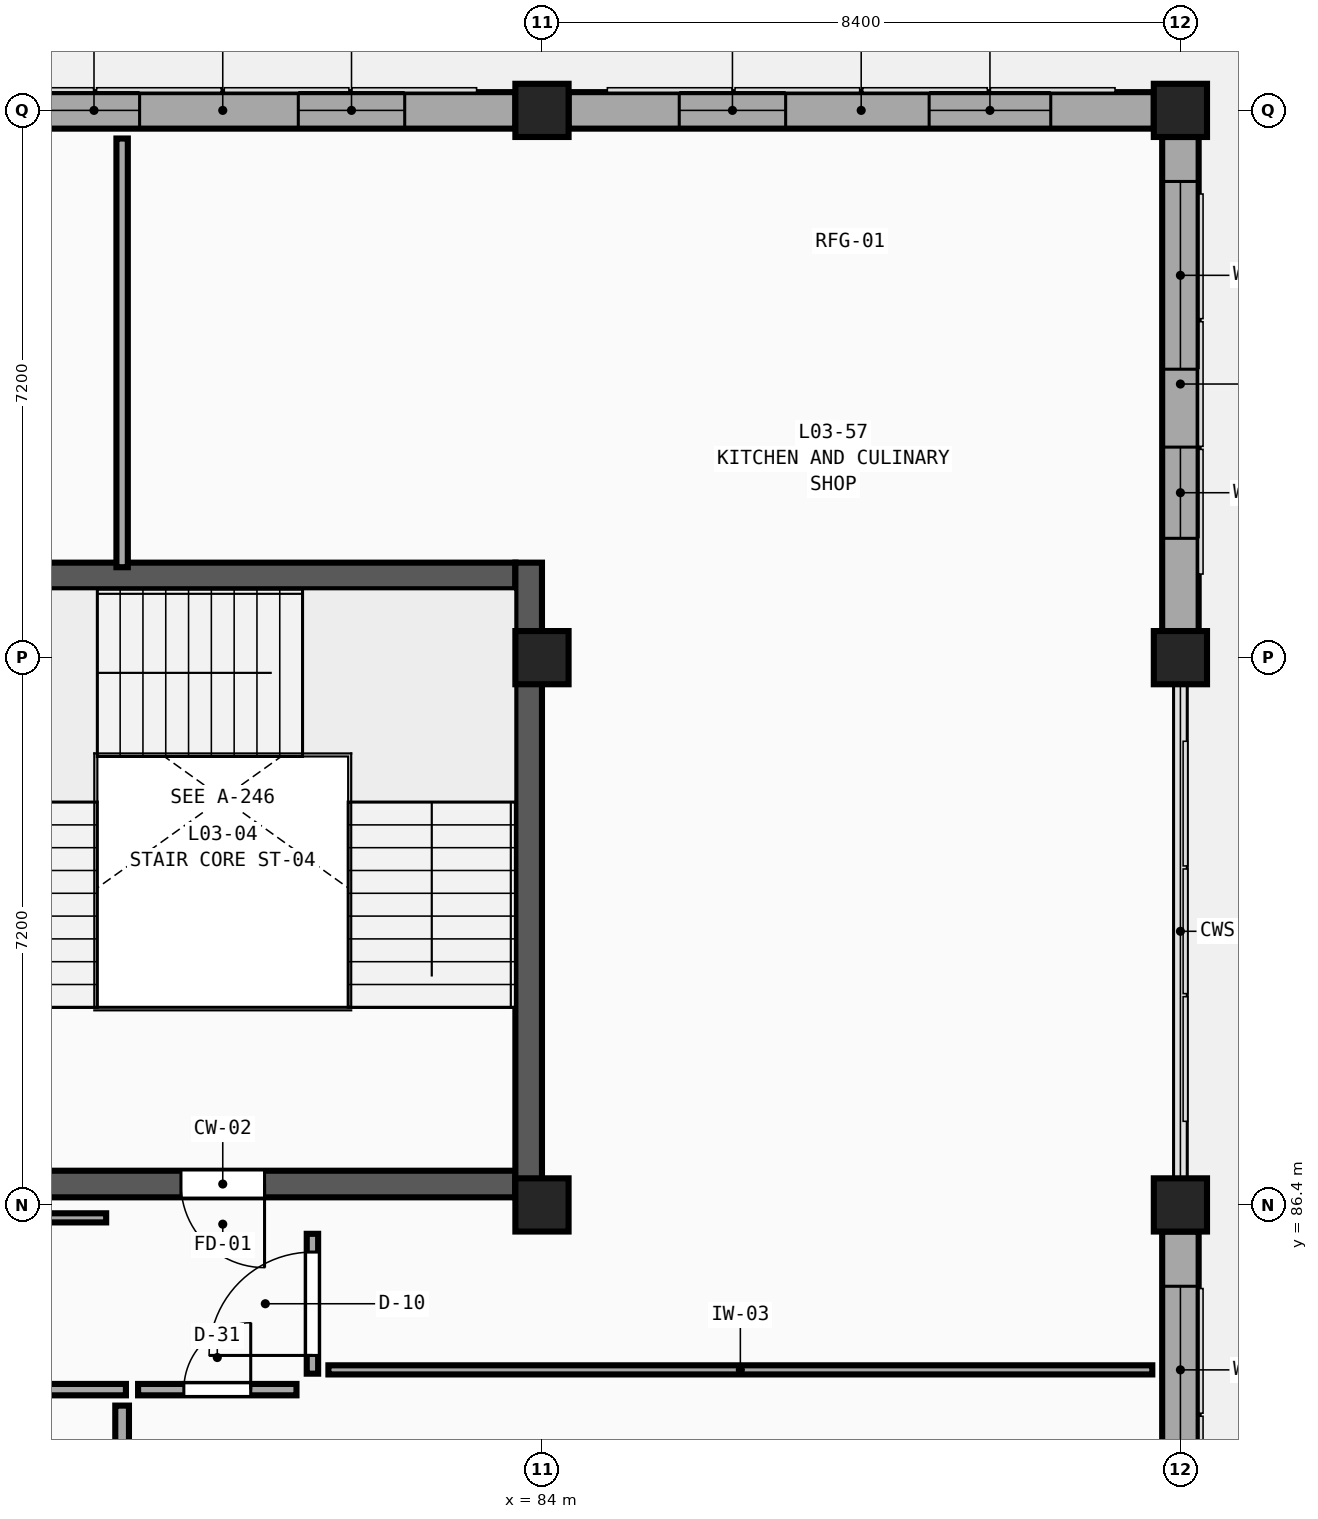
"""IFC4 building model, lengths in metres.
Left out: names, types, materials, properties, quantities, classifications, styles, units other than length and angle.
Written with IfcOpenShell. Run it as: python <this file> out.ifc"""

import sys

from ifc_helpers import new_model, si_unit, direction, frame, frame_2d, origin, origin_2d, place, context, subcontext, project, spatial, rectangle, extrude, element, fill, save


model = new_model("IFC4")
c1 = context("Model", 3, precision=1e-05, world=origin(), true_north=direction((0.0, 1.0)))
c2 = subcontext(c1, "Body", "Model", "MODEL_VIEW")
j1 = project(units=[si_unit("LENGTHUNIT", "METRE"), si_unit("PLANEANGLEUNIT", "RADIAN")], contexts=[c1])
p1 = place(None, origin())
s1 = spatial("IfcSite", under=j1, at=p1, CompositionType="ELEMENT")
p2 = place(p1, origin())
s2 = spatial("IfcBuilding", under=s1, at=p2, CompositionType="ELEMENT")
p3 = place(p2, frame((0.0, 0.0, 14.4)))
s3 = spatial("IfcBuildingStorey", under=s2, at=p3, CompositionType="ELEMENT", Elevation=14.4)
for number, where, z_axis, x_axis in (
    (1, (84.0, 86.4, 0.0), (0.0, 0.0, 1.0), (1.0, 0.0, 0.0)),
    (2, (84.0, 93.6, 0.0), (0.0, 0.0, 1.0), (1.0, 0.0, 0.0)),
    (3, (84.0, 100.8, 0.0), (0.0, 0.0, 1.0), (1.0, 0.0, 0.0)),
    (4, (92.4, 86.4, 0.0), (0.0, 0.0, 1.0), (1.0, 0.0, 0.0)),
    (5, (92.4, 93.6, 0.0), (0.0, 0.0, 1.0), (1.0, 0.0, 0.0)),
    (6, (92.4, 100.8, 0.0), (0.0, 0.0, 1.0), (1.0, 0.0, 0.0)),
):
    element("IfcColumn", number, at=place(p3, frame(where, z_axis=z_axis, x_axis=x_axis)), inside=s3, PredefinedType="COLUMN", context=c2, shape_type="SweptSolid", body=[
        extrude(rectangle(XDim=0.7, YDim=0.7, at=origin_2d()), origin(), (0.0, 0.0, 1.0), 4.5),
    ])
p4 = place(p3, frame((75.95, 100.8, 0.0), z_axis=(0.0, 0.0, 1.0), x_axis=(1.0, 0.0, 0.0)))
e7 = element("IfcWall", 7, at=p4, inside=s3, PredefinedType="SOLIDWALL", context=c2, shape_type="SweptSolid", body=[
    extrude(rectangle(XDim=7.7, YDim=0.48, at=frame_2d((3.85, 0.0))), origin(), (0.0, 0.0, 1.0), 3.63),
])
p5 = place(p4, frame((1.556, 0.0, 0.75)))
e8 = element("IfcOpeningElement", 8, at=p5, cuts=e7, PredefinedType="OPENING", context=c2, shape_type="SweptSolid", body=[
    extrude(rectangle(XDim=1.2, YDim=2.73, at=frame_2d((0.6, 1.365))), frame((0.0, 0.26, 0.0), z_axis=(0.0, -1.0, 0.0), x_axis=(1.0, 0.0, 0.0)), (0.0, 0.0, 1.0), 0.52),
])
p6 = place(p4, frame((4.844, 0.0, 0.75)))
e9 = element("IfcOpeningElement", 9, at=p6, cuts=e7, PredefinedType="OPENING", context=c2, shape_type="SweptSolid", body=[
    extrude(rectangle(XDim=1.4, YDim=2.73, at=frame_2d((0.7, 1.365))), frame((0.0, 0.26, 0.0), z_axis=(0.0, -1.0, 0.0), x_axis=(1.0, 0.0, 0.0)), (0.0, 0.0, 1.0), 0.52),
])
p7 = place(p3, frame((92.4, 86.05, 0.0), z_axis=(0.0, 0.0, 1.0), x_axis=(0.0, -1.0, 0.0)))
e10 = element("IfcWall", 10, at=p7, inside=s3, PredefinedType="SOLIDWALL", context=c2, shape_type="SweptSolid", body=[
    extrude(rectangle(XDim=6.5, YDim=0.48, at=frame_2d((3.25, 0.0))), origin(), (0.0, 0.0, 1.0), 3.63),
])
p8 = place(p7, frame((0.72, 0.0, 0.75)))
e11 = element("IfcOpeningElement", 11, at=p8, cuts=e10, PredefinedType="OPENING", context=c2, shape_type="SweptSolid", body=[
    extrude(rectangle(XDim=2.2, YDim=2.73, at=frame_2d((1.1, 1.365))), frame((0.0, 0.26, 0.0), z_axis=(0.0, -1.0, 0.0), x_axis=(1.0, 0.0, 0.0)), (0.0, 0.0, 1.0), 0.52),
])
p9 = place(p7, frame((3.48, 0.0, 0.75)))
e12 = element("IfcOpeningElement", 12, at=p9, cuts=e10, PredefinedType="OPENING", context=c2, shape_type="SweptSolid", body=[
    extrude(rectangle(XDim=2.4, YDim=2.73, at=frame_2d((1.2, 1.365))), frame((0.0, 0.26, 0.0), z_axis=(0.0, -1.0, 0.0), x_axis=(1.0, 0.0, 0.0)), (0.0, 0.0, 1.0), 0.52),
])
p10 = place(p3, frame((92.4, 100.45, 0.0), z_axis=(0.0, 0.0, 1.0), x_axis=(0.0, -1.0, 0.0)))
e13 = element("IfcWall", 13, at=p10, inside=s3, PredefinedType="SOLIDWALL", context=c2, shape_type="SweptSolid", body=[
    extrude(rectangle(XDim=6.5, YDim=0.48, at=frame_2d((3.25, 0.0))), origin(), (0.0, 0.0, 1.0), 3.63),
])
p11 = place(p10, frame((0.585, 0.0, 0.75)))
e14 = element("IfcOpeningElement", 14, at=p11, cuts=e13, PredefinedType="OPENING", context=c2, shape_type="SweptSolid", body=[
    extrude(rectangle(XDim=2.47, YDim=2.73, at=frame_2d((1.235, 1.365))), frame((0.0, 0.26, 0.0), z_axis=(0.0, -1.0, 0.0), x_axis=(1.0, 0.0, 0.0)), (0.0, 0.0, 1.0), 0.52),
])
p12 = place(p10, frame((4.08, 0.0, 0.75)))
e15 = element("IfcOpeningElement", 15, at=p12, cuts=e13, PredefinedType="OPENING", context=c2, shape_type="SweptSolid", body=[
    extrude(rectangle(XDim=1.2, YDim=1.9, at=frame_2d((0.6, 0.95))), frame((0.0, 0.26, 0.0), z_axis=(0.0, -1.0, 0.0), x_axis=(1.0, 0.0, 0.0)), (0.0, 0.0, 1.0), 0.52),
])
p13 = place(p3, frame((84.35, 100.8, 0.0), z_axis=(0.0, 0.0, 1.0), x_axis=(1.0, 0.0, 0.0)))
e16 = element("IfcWall", 16, at=p13, inside=s3, PredefinedType="SOLIDWALL", context=c2, shape_type="SweptSolid", body=[
    extrude(rectangle(XDim=7.7, YDim=0.48, at=frame_2d((3.85, 0.0))), origin(), (0.0, 0.0, 1.0), 3.63),
])
p14 = place(p13, frame((1.456, 0.0, 0.75)))
e17 = element("IfcOpeningElement", 17, at=p14, cuts=e16, PredefinedType="OPENING", context=c2, shape_type="SweptSolid", body=[
    extrude(rectangle(XDim=1.4, YDim=1.9, at=frame_2d((0.7, 0.95))), frame((0.0, 0.26, 0.0), z_axis=(0.0, -1.0, 0.0), x_axis=(1.0, 0.0, 0.0)), (0.0, 0.0, 1.0), 0.52),
])
p15 = place(p13, frame((4.744, 0.0, 0.75)))
e18 = element("IfcOpeningElement", 18, at=p15, cuts=e16, PredefinedType="OPENING", context=c2, shape_type="SweptSolid", body=[
    extrude(rectangle(XDim=1.6, YDim=1.9, at=frame_2d((0.8, 0.95))), frame((0.0, 0.26, 0.0), z_axis=(0.0, -1.0, 0.0), x_axis=(1.0, 0.0, 0.0)), (0.0, 0.0, 1.0), 0.52),
])
p16 = place(p3, frame((83.65, 86.675, 0.0), z_axis=(0.0, 0.0, 1.0), x_axis=(-1.0, 0.0, 0.0)))
e19 = element("IfcWall", 19, at=p16, inside=s3, PredefinedType="SHEAR", context=c2, shape_type="SweptSolid", body=[
    extrude(rectangle(XDim=7.7, YDim=0.35, at=frame_2d((3.85, 0.0))), origin(), (0.0, 0.0, 1.0), 4.5),
])
p17 = place(p16, frame((3.3, 0.0, 0.0)))
e20 = element("IfcOpeningElement", 20, at=p17, cuts=e19, PredefinedType="OPENING", context=c2, shape_type="SweptSolid", body=[
    extrude(rectangle(XDim=1.1, YDim=2.2, at=frame_2d((0.55, 1.1))), frame((0.0, 0.195, 0.0), z_axis=(0.0, -1.0, 0.0), x_axis=(1.0, 0.0, 0.0)), (0.0, 0.0, 1.0), 0.39),
])
p18 = place(p3, frame((75.95, 94.675, 0.0), z_axis=(0.0, 0.0, 1.0), x_axis=(1.0, 0.0, 0.0)))
e21 = element("IfcWall", 21, at=p18, inside=s3, PredefinedType="SHEAR", context=c2, shape_type="SweptSolid", body=[
    extrude(rectangle(XDim=7.7, YDim=0.35, at=frame_2d((3.85, 0.0))), origin(), (0.0, 0.0, 1.0), 4.5),
])
p19 = place(p3, frame((83.825, 86.5, 0.0), z_axis=(0.0, 0.0, 1.0), x_axis=(0.0, 1.0, 0.0)))
e22 = element("IfcWall", 22, at=p19, inside=s3, PredefinedType="SHEAR", context=c2, shape_type="SweptSolid", body=[
    extrude(rectangle(XDim=8.35, YDim=0.35, at=frame_2d((4.175, 0.0))), origin(), (0.0, 0.0, 1.0), 4.5),
])
p20 = place(p3, frame((62.562, 83.97, 0.0), z_axis=(0.0, 0.0, 1.0), x_axis=(1.0, 0.0, 0.0)))
e23 = element("IfcWall", 23, at=p20, inside=s3, PredefinedType="PARTITIONING", context=c2, shape_type="SweptSolid", body=[
    extrude(rectangle(XDim=15.964, YDim=0.15, at=frame_2d((7.982, 0.0))), origin(), (0.0, 0.0, 1.0), 4.18),
])
p21 = place(p20, frame((7.302, 0.0, 0.0)))
e24 = element("IfcOpeningElement", 24, at=p21, cuts=e23, PredefinedType="OPENING", context=c2, shape_type="SweptSolid", body=[
    extrude(rectangle(XDim=1.36, YDim=2.37, at=frame_2d((0.68, 1.185))), frame((0.0, 0.095, 0.0), z_axis=(0.0, -1.0, 0.0), x_axis=(1.0, 0.0, 0.0)), (0.0, 0.0, 1.0), 0.19),
])
p22 = place(p3, frame((75.97, 86.23, 0.0), z_axis=(0.0, 0.0, 1.0), x_axis=(1.0, 0.0, 0.0)))
e25 = element("IfcWall", 25, at=p22, inside=s3, PredefinedType="PARTITIONING", context=c2, shape_type="SweptSolid", body=[
    extrude(rectangle(XDim=2.296, YDim=0.12, at=frame_2d((1.148, 0.0))), origin(), (0.0, 0.0, 1.0), 3.73),
])
p23 = place(p3, frame((78.686, 83.97, 0.0), z_axis=(0.0, 0.0, 1.0), x_axis=(1.0, 0.0, 0.0)))
e26 = element("IfcWall", 26, at=p23, inside=s3, PredefinedType="PARTITIONING", context=c2, shape_type="SweptSolid", body=[
    extrude(rectangle(XDim=2.084, YDim=0.15, at=frame_2d((1.042, 0.0))), origin(), (0.0, 0.0, 1.0), 4.18),
])
p24 = place(p23, frame((0.602, 0.0, 0.0)))
e27 = element("IfcOpeningElement", 27, at=p24, cuts=e26, PredefinedType="OPENING", context=c2, shape_type="SweptSolid", body=[
    extrude(rectangle(XDim=0.88, YDim=2.45, at=frame_2d((0.44, 1.225))), frame((0.0, 0.095, 0.0), z_axis=(0.0, -1.0, 0.0), x_axis=(1.0, 0.0, 0.0)), (0.0, 0.0, 1.0), 0.19),
])
p25 = place(p3, frame((80.98, 84.18, 0.0), z_axis=(0.0, 0.0, 1.0), x_axis=(0.0, 1.0, 0.0)))
e28 = element("IfcWall", 28, at=p25, inside=s3, PredefinedType="PARTITIONING", context=c2, shape_type="SweptSolid", body=[
    extrude(rectangle(XDim=1.84, YDim=0.15, at=frame_2d((0.92, 0.0))), origin(), (0.0, 0.0, 1.0), 4.18),
])
p26 = place(p25, frame((0.24, 0.0, 0.0)))
e29 = element("IfcOpeningElement", 29, at=p26, cuts=e28, PredefinedType="OPENING", context=c2, shape_type="SweptSolid", body=[
    extrude(rectangle(XDim=1.36, YDim=2.13, at=frame_2d((0.68, 1.065))), frame((0.0, 0.095, 0.0), z_axis=(0.0, -1.0, 0.0), x_axis=(1.0, 0.0, 0.0)), (0.0, 0.0, 1.0), 0.19),
])
p27 = place(p3, frame((81.19, 84.23, 0.0), z_axis=(0.0, 0.0, 1.0), x_axis=(1.0, 0.0, 0.0)))
e30 = element("IfcWall", 30, at=p27, inside=s3, PredefinedType="PARTITIONING", context=c2, shape_type="SweptSolid", body=[
    extrude(rectangle(XDim=10.84, YDim=0.12, at=frame_2d((5.42, 0.0))), origin(), (0.0, 0.0, 1.0), 4.18),
])
p28 = place(p3, frame((78.476, 94.79, 0.0), z_axis=(0.0, 0.0, 1.0), x_axis=(0.0, 1.0, 0.0)))
e31 = element("IfcWall", 31, at=p28, inside=s3, PredefinedType="PARTITIONING", context=c2, shape_type="SweptSolid", body=[
    extrude(rectangle(XDim=5.64, YDim=0.15, at=frame_2d((2.82, 0.0))), origin(), (0.0, 0.0, 1.0), 4.18),
])
p29 = place(p3, frame((78.476, 79.09, 0.0), z_axis=(0.0, 0.0, 1.0), x_axis=(0.0, 1.0, 0.0)))
e32 = element("IfcWall", 32, at=p29, inside=s3, PredefinedType="PARTITIONING", context=c2, shape_type="SweptSolid", body=[
    extrude(rectangle(XDim=4.67, YDim=0.18, at=frame_2d((2.335, 0.0))), origin(), (0.0, 0.0, 1.0), 4.18),
])
p30 = place(p5, origin())
e33 = element("IfcWindow", 33, at=p30, inside=s3, PartitioningType="SINGLE_PANEL", PredefinedType="WINDOW", context=c2, shape_type="SweptSolid", body=[
    extrude(rectangle(XDim=1.2, YDim=2.73, at=frame_2d((0.6, 1.365))), frame((0.0, 0.03, 0.0), z_axis=(0.0, -1.0, 0.0), x_axis=(1.0, 0.0, 0.0)), (0.0, 0.0, 1.0), 0.06),
])
fill(e8, e33)
p31 = place(p6, origin())
e34 = element("IfcWindow", 34, at=p31, inside=s3, PartitioningType="DOUBLE_PANEL_VERTICAL", PredefinedType="WINDOW", context=c2, shape_type="SweptSolid", body=[
    extrude(rectangle(XDim=1.4, YDim=2.73, at=frame_2d((0.7, 1.365))), frame((0.0, 0.03, 0.0), z_axis=(0.0, -1.0, 0.0), x_axis=(1.0, 0.0, 0.0)), (0.0, 0.0, 1.0), 0.06),
])
fill(e9, e34)
p32 = place(p8, origin())
e35 = element("IfcWindow", 35, at=p32, inside=s3, PartitioningType="TRIPLE_PANEL_VERTICAL", PredefinedType="WINDOW", context=c2, shape_type="SweptSolid", body=[
    extrude(rectangle(XDim=2.2, YDim=2.73, at=frame_2d((1.1, 1.365))), frame((0.0, 0.03, 0.0), z_axis=(0.0, -1.0, 0.0), x_axis=(1.0, 0.0, 0.0)), (0.0, 0.0, 1.0), 0.06),
])
fill(e11, e35)
p33 = place(p11, origin())
e36 = element("IfcWindow", 36, at=p33, inside=s3, PartitioningType="TRIPLE_PANEL_VERTICAL", PredefinedType="WINDOW", context=c2, shape_type="SweptSolid", body=[
    extrude(rectangle(XDim=2.47, YDim=2.73, at=frame_2d((1.235, 1.365))), frame((0.0, 0.03, 0.0), z_axis=(0.0, -1.0, 0.0), x_axis=(1.0, 0.0, 0.0)), (0.0, 0.0, 1.0), 0.06),
])
fill(e14, e36)
p34 = place(p12, origin())
e37 = element("IfcWindow", 37, at=p34, inside=s3, PartitioningType="SINGLE_PANEL", PredefinedType="WINDOW", context=c2, shape_type="SweptSolid", body=[
    extrude(rectangle(XDim=1.2, YDim=1.9, at=frame_2d((0.6, 0.95))), frame((0.0, 0.03, 0.0), z_axis=(0.0, -1.0, 0.0), x_axis=(1.0, 0.0, 0.0)), (0.0, 0.0, 1.0), 0.06),
])
fill(e15, e37)
p35 = place(p14, origin())
e38 = element("IfcWindow", 38, at=p35, inside=s3, PartitioningType="DOUBLE_PANEL_VERTICAL", PredefinedType="WINDOW", context=c2, shape_type="SweptSolid", body=[
    extrude(rectangle(XDim=1.4, YDim=1.9, at=frame_2d((0.7, 0.95))), frame((0.0, 0.03, 0.0), z_axis=(0.0, -1.0, 0.0), x_axis=(1.0, 0.0, 0.0)), (0.0, 0.0, 1.0), 0.06),
])
fill(e17, e38)
p36 = place(p15, origin())
e39 = element("IfcWindow", 39, at=p36, inside=s3, PartitioningType="DOUBLE_PANEL_VERTICAL", PredefinedType="WINDOW", context=c2, shape_type="SweptSolid", body=[
    extrude(rectangle(XDim=1.6, YDim=1.9, at=frame_2d((0.8, 0.95))), frame((0.0, 0.03, 0.0), z_axis=(0.0, -1.0, 0.0), x_axis=(1.0, 0.0, 0.0)), (0.0, 0.0, 1.0), 0.06),
])
fill(e18, e39)
p37 = place(p17, origin())
e40 = element("IfcDoor", 40, at=p37, inside=s3, OperationType="SINGLE_SWING_LEFT", PredefinedType="DOOR", context=c2, shape_type="SweptSolid", body=[
    extrude(rectangle(XDim=1.1, YDim=2.2, at=frame_2d((0.55, 1.1))), frame((0.0, 0.025, 0.0), z_axis=(0.0, -1.0, 0.0), x_axis=(1.0, 0.0, 0.0)), (0.0, 0.0, 1.0), 0.05),
])
fill(e20, e40)
p38 = place(p24, origin())
e41 = element("IfcDoor", 41, at=p38, inside=s3, OperationType="SINGLE_SWING_RIGHT", PredefinedType="DOOR", context=c2, shape_type="SweptSolid", body=[
    extrude(rectangle(XDim=0.88, YDim=2.45, at=frame_2d((0.44, 1.225))), frame((0.0, 0.025, 0.0), z_axis=(0.0, -1.0, 0.0), x_axis=(1.0, 0.0, 0.0)), (0.0, 0.0, 1.0), 0.05),
])
fill(e27, e41)
p39 = place(p26, origin())
e42 = element("IfcDoor", 42, at=p39, inside=s3, OperationType="SINGLE_SWING_LEFT", PredefinedType="DOOR", context=c2, shape_type="SweptSolid", body=[
    extrude(rectangle(XDim=1.36, YDim=2.13, at=frame_2d((0.68, 1.065))), frame((0.0, 0.025, 0.0), z_axis=(0.0, -1.0, 0.0), x_axis=(1.0, 0.0, 0.0)), (0.0, 0.0, 1.0), 0.05),
])
fill(e29, e42)
save(model, sys.argv[1])
